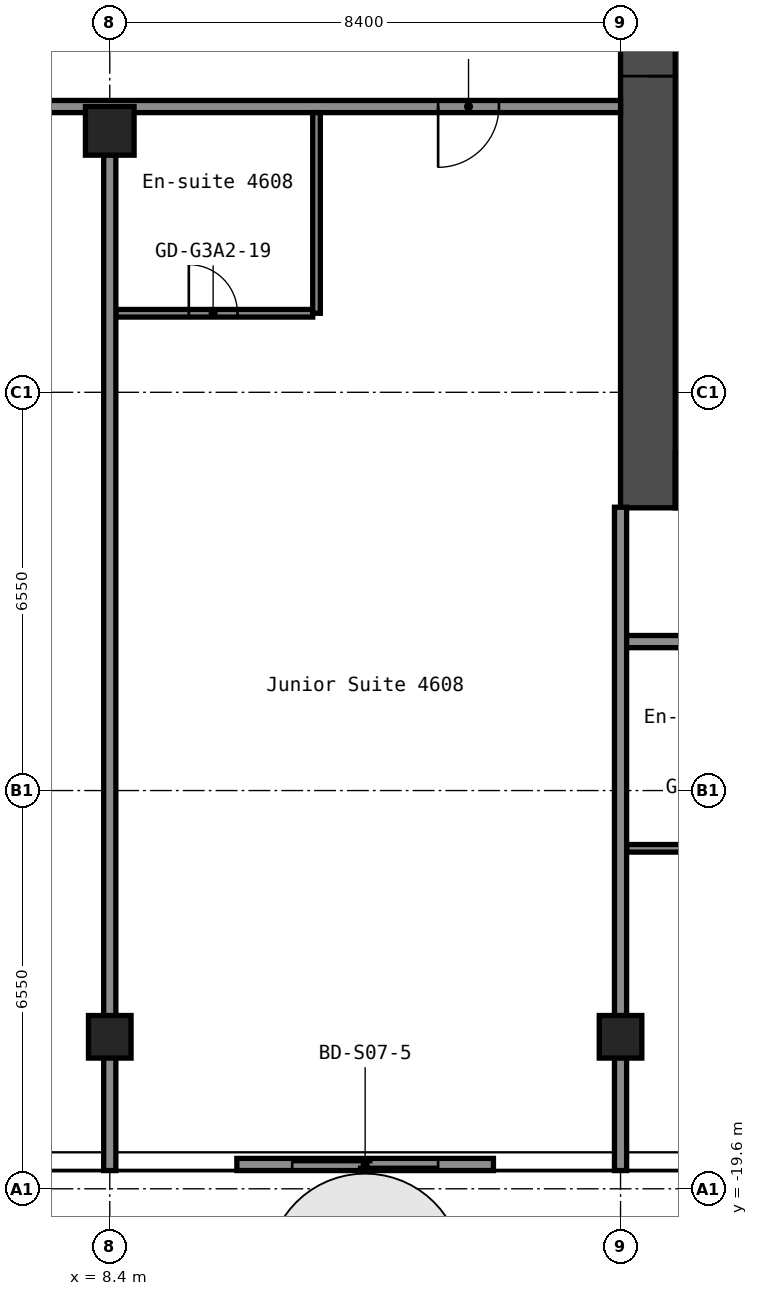
"""IFC4 building model, lengths in metres.
Left out: names, types, materials, properties, quantities, classifications, styles, units other than length and angle.
Written with IfcOpenShell. Run it as: python <this file> out.ifc"""

import sys

from ifc_helpers import new_model, si_unit, direction, frame, frame_2d, origin, origin_2d, place, context, subcontext, project, spatial, rectangle, hollow_rectangle, extrude, element, fill, save


model = new_model("IFC4")
c1 = context("Model", 3, precision=1e-05, world=origin(), true_north=direction((0.0, 1.0)))
c2 = subcontext(c1, "Body", "Model", "MODEL_VIEW")
j1 = project(units=[si_unit("LENGTHUNIT", "METRE"), si_unit("PLANEANGLEUNIT", "RADIAN")], contexts=[c1])
p1 = place(None, origin())
s1 = spatial("IfcSite", under=j1, at=p1, CompositionType="ELEMENT")
p2 = place(p1, origin())
s2 = spatial("IfcBuilding", under=s1, at=p2, CompositionType="ELEMENT")
p3 = place(p2, frame((0.0, 0.0, 163.0)))
s3 = spatial("IfcBuildingStorey", under=s2, at=p3, CompositionType="ELEMENT", Elevation=163.0)
p4 = place(p3, frame((8.4, -17.1, 0.0), z_axis=(0.0, 0.0, 1.0), x_axis=(1.0, 0.0, 0.0)))
e1 = element("IfcColumn", 1, at=p4, inside=s3, PredefinedType="COLUMN", context=c2, shape_type="SweptSolid", body=[
    extrude(hollow_rectangle(XDim=0.7, YDim=0.7, WallThickness=0.028, at=origin_2d()), origin(), (0.0, 0.0, 1.0), 2.75),
])
p5 = place(p3, frame((8.4, -2.2, 0.0), z_axis=(0.0, 0.0, 1.0), x_axis=(1.0, 0.0, 0.0)))
e2 = element("IfcColumn", 2, at=p5, inside=s3, PredefinedType="COLUMN", context=c2, shape_type="SweptSolid", body=[
    extrude(hollow_rectangle(XDim=0.8, YDim=0.8, WallThickness=0.032, at=origin_2d()), origin(), (0.0, 0.0, 1.0), 2.75),
])
p6 = place(p3, frame((16.8, -17.1, 0.0), z_axis=(0.0, 0.0, 1.0), x_axis=(1.0, 0.0, 0.0)))
e3 = element("IfcColumn", 3, at=p6, inside=s3, PredefinedType="COLUMN", context=c2, shape_type="SweptSolid", body=[
    extrude(hollow_rectangle(XDim=0.7, YDim=0.7, WallThickness=0.028, at=origin_2d()), origin(), (0.0, 0.0, 1.0), 2.75),
])
p7 = place(p3, frame((17.25, -8.4, 0.0), z_axis=(0.0, 0.0, 1.0), x_axis=(0.0, 1.0, 0.0)))
e4 = element("IfcWall", 4, at=p7, inside=s3, PredefinedType="SHEAR", context=c2, shape_type="SweptSolid", body=[
    extrude(rectangle(XDim=16.8, YDim=0.9, at=frame_2d((8.4, 0.0))), origin(), (0.0, 0.0, 1.0), 2.75),
])
p8 = place(p7, frame((7.1, 0.0, 0.0)))
e5 = element("IfcOpeningElement", 5, at=p8, cuts=e4, PredefinedType="OPENING", context=c2, shape_type="SweptSolid", body=[
    extrude(rectangle(XDim=1.6, YDim=2.1, at=frame_2d((0.8, 1.05))), frame((0.0, 0.46, 0.0), z_axis=(0.0, -1.0, 0.0), x_axis=(1.0, 0.0, 0.0)), (0.0, 0.0, 1.0), 0.92),
])
p9 = place(p3, frame((17.7, -7.95, 0.0), z_axis=(0.0, 0.0, 1.0), x_axis=(1.0, 0.0, 0.0)))
e6 = element("IfcWall", 6, at=p9, inside=s3, PredefinedType="SHEAR", context=c2, shape_type="SweptSolid", body=[
    extrude(rectangle(XDim=15.0, YDim=0.9, at=frame_2d((7.5, 0.0))), origin(), (0.0, 0.0, 1.0), 2.75),
])
p10 = place(p9, frame((2.55, 0.0, 0.0)))
e7 = element("IfcOpeningElement", 7, at=p10, cuts=e6, PredefinedType="OPENING", context=c2, shape_type="SweptSolid", body=[
    extrude(rectangle(XDim=1.0, YDim=2.1, at=frame_2d((0.5, 1.05))), frame((0.0, 0.46, 0.0), z_axis=(0.0, -1.0, 0.0), x_axis=(1.0, 0.0, 0.0)), (0.0, 0.0, 1.0), 0.92),
])
p11 = place(p3, frame((16.9, -14.0, 0.0), z_axis=(0.0, 0.0, 1.0), x_axis=(1.0, 0.0, 0.0)))
e8 = element("IfcWall", 8, at=p11, inside=s3, PredefinedType="PARTITIONING", context=c2, shape_type="SweptSolid", body=[
    extrude(rectangle(XDim=3.238, YDim=0.125, at=frame_2d((1.619, 0.0))), origin(), (0.0, 0.0, 1.0), 2.75),
])
p12 = place(p11, frame((1.2, 0.0, 0.0)))
e9 = element("IfcOpeningElement", 9, at=p12, cuts=e8, PredefinedType="OPENING", context=c2, shape_type="SweptSolid", body=[
    extrude(rectangle(XDim=0.8, YDim=2.1, at=frame_2d((0.4, 1.05))), frame((0.0, 0.073, 0.0), z_axis=(0.0, -1.0, 0.0), x_axis=(1.0, 0.0, 0.0)), (0.0, 0.0, 1.0), 0.145),
])
p13 = place(p3, frame((16.8, -10.6, 0.0), z_axis=(0.0, 0.0, 1.0), x_axis=(1.0, 0.0, 0.0)))
e10 = element("IfcWall", 10, at=p13, inside=s3, PredefinedType="PARTITIONING", context=c2, shape_type="SweptSolid", body=[
    extrude(rectangle(XDim=25.9, YDim=0.2, at=frame_2d((12.95, 0.0))), origin(), (0.0, 0.0, 1.0), 2.75),
])
p14 = place(p13, frame((5.4, 0.0, 0.0)))
e11 = element("IfcOpeningElement", 11, at=p14, cuts=e10, PredefinedType="OPENING", context=c2, shape_type="SweptSolid", body=[
    extrude(rectangle(XDim=1.0, YDim=2.1, at=frame_2d((0.5, 1.05))), frame((0.0, 0.11, 0.0), z_axis=(0.0, -1.0, 0.0), x_axis=(1.0, 0.0, 0.0)), (0.0, 0.0, 1.0), 0.22),
])
p15 = place(p13, frame((10.4, 0.0, 0.0)))
e12 = element("IfcOpeningElement", 12, at=p15, cuts=e10, PredefinedType="OPENING", context=c2, shape_type="SweptSolid", body=[
    extrude(rectangle(XDim=1.0, YDim=2.1, at=frame_2d((0.5, 1.05))), frame((0.0, 0.11, 0.0), z_axis=(0.0, -1.0, 0.0), x_axis=(1.0, 0.0, 0.0)), (0.0, 0.0, 1.0), 0.22),
])
p16 = place(p13, frame((22.4, 0.0, 0.0)))
e13 = element("IfcOpeningElement", 13, at=p16, cuts=e10, PredefinedType="OPENING", context=c2, shape_type="SweptSolid", body=[
    extrude(rectangle(XDim=1.0, YDim=2.1, at=frame_2d((0.5, 1.05))), frame((0.0, 0.11, 0.0), z_axis=(0.0, -1.0, 0.0), x_axis=(1.0, 0.0, 0.0)), (0.0, 0.0, 1.0), 0.22),
])
p17 = place(p3, frame((8.5, -5.2, 0.0), z_axis=(0.0, 0.0, 1.0), x_axis=(1.0, 0.0, 0.0)))
e14 = element("IfcWall", 14, at=p17, inside=s3, PredefinedType="PARTITIONING", context=c2, shape_type="SweptSolid", body=[
    extrude(rectangle(XDim=3.238, YDim=0.125, at=frame_2d((1.619, 0.0))), origin(), (0.0, 0.0, 1.0), 2.75),
])
p18 = place(p17, frame((1.2, 0.0, 0.0)))
e15 = element("IfcOpeningElement", 15, at=p18, cuts=e14, PredefinedType="OPENING", context=c2, shape_type="SweptSolid", body=[
    extrude(rectangle(XDim=0.8, YDim=2.1, at=frame_2d((0.4, 1.05))), frame((0.0, 0.073, 0.0), z_axis=(0.0, -1.0, 0.0), x_axis=(1.0, 0.0, 0.0)), (0.0, 0.0, 1.0), 0.145),
])
p19 = place(p3, frame((-16.8, -1.8, 0.0), z_axis=(0.0, 0.0, 1.0), x_axis=(1.0, 0.0, 0.0)))
e16 = element("IfcWall", 16, at=p19, inside=s3, PredefinedType="PARTITIONING", context=c2, shape_type="SweptSolid", body=[
    extrude(rectangle(XDim=33.6, YDim=0.2, at=frame_2d((16.8, 0.0))), origin(), (0.0, 0.0, 1.0), 2.75),
])
p20 = place(p19, frame((5.4, 0.0, 0.0)))
e17 = element("IfcOpeningElement", 17, at=p20, cuts=e16, PredefinedType="OPENING", context=c2, shape_type="SweptSolid", body=[
    extrude(rectangle(XDim=1.0, YDim=2.1, at=frame_2d((0.5, 1.05))), frame((0.0, 0.11, 0.0), z_axis=(0.0, -1.0, 0.0), x_axis=(1.0, 0.0, 0.0)), (0.0, 0.0, 1.0), 0.22),
])
p21 = place(p19, frame((10.385, 0.0, 0.0)))
e18 = element("IfcOpeningElement", 18, at=p21, cuts=e16, PredefinedType="OPENING", context=c2, shape_type="SweptSolid", body=[
    extrude(rectangle(XDim=0.9, YDim=2.1, at=frame_2d((0.45, 1.05))), frame((0.0, 0.11, 0.0), z_axis=(0.0, -1.0, 0.0), x_axis=(1.0, 0.0, 0.0)), (0.0, 0.0, 1.0), 0.22),
])
p22 = place(p19, frame((14.585, 0.0, 0.0)))
e19 = element("IfcOpeningElement", 19, at=p22, cuts=e16, PredefinedType="OPENING", context=c2, shape_type="SweptSolid", body=[
    extrude(rectangle(XDim=0.9, YDim=2.1, at=frame_2d((0.45, 1.05))), frame((0.0, 0.11, 0.0), z_axis=(0.0, -1.0, 0.0), x_axis=(1.0, 0.0, 0.0)), (0.0, 0.0, 1.0), 0.22),
])
p23 = place(p19, frame((22.2, 0.0, 0.0)))
e20 = element("IfcOpeningElement", 20, at=p23, cuts=e16, PredefinedType="OPENING", context=c2, shape_type="SweptSolid", body=[
    extrude(rectangle(XDim=1.0, YDim=2.1, at=frame_2d((0.5, 1.05))), frame((0.0, 0.11, 0.0), z_axis=(0.0, -1.0, 0.0), x_axis=(1.0, 0.0, 0.0)), (0.0, 0.0, 1.0), 0.22),
])
p24 = place(p19, frame((30.6, 0.0, 0.0)))
e21 = element("IfcOpeningElement", 21, at=p24, cuts=e16, PredefinedType="OPENING", context=c2, shape_type="SweptSolid", body=[
    extrude(rectangle(XDim=1.0, YDim=2.1, at=frame_2d((0.5, 1.05))), frame((0.0, 0.11, 0.0), z_axis=(0.0, -1.0, 0.0), x_axis=(1.0, 0.0, 0.0)), (0.0, 0.0, 1.0), 0.22),
])
p25 = place(p3, frame((8.4, -19.3, 0.0), z_axis=(0.0, 0.0, 1.0), x_axis=(0.0, 1.0, 0.0)))
e22 = element("IfcWall", 22, at=p25, inside=s3, PredefinedType="PARTITIONING", context=c2, shape_type="SweptSolid", body=[
    extrude(rectangle(XDim=16.71, YDim=0.2, at=frame_2d((8.355, 0.0))), origin(), (0.0, 0.0, 1.0), 2.75),
])
p26 = place(p3, frame((11.8, -5.2, 0.0), z_axis=(0.0, 0.0, 1.0), x_axis=(0.0, 1.0, 0.0)))
e23 = element("IfcWall", 23, at=p26, inside=s3, PredefinedType="PARTITIONING", context=c2, shape_type="SweptSolid", body=[
    extrude(rectangle(XDim=3.3, YDim=0.125, at=frame_2d((1.65, 0.0))), origin(), (0.0, 0.0, 1.0), 2.75),
])
p27 = place(p3, frame((16.8, -19.3, 0.0), z_axis=(0.0, 0.0, 1.0), x_axis=(0.0, 1.0, 0.0)))
e24 = element("IfcWall", 24, at=p27, inside=s3, PredefinedType="PARTITIONING", context=c2, shape_type="SweptSolid", body=[
    extrude(rectangle(XDim=10.91, YDim=0.2, at=frame_2d((5.455, 0.0))), origin(), (0.0, 0.0, 1.0), 2.75),
])
p28 = place(p3, frame((10.49, -19.2, 0.0), z_axis=(0.0, 0.0, 1.0), x_axis=(1.0, 0.0, 0.0)))
p29 = place(p28, frame((0.91, 0.0, 0.0)))
p30 = place(p29, frame((2.4, 0.0, 0.0), z_axis=(0.0, 0.0, 1.0), x_axis=(-1.0, 0.0, 0.0)))
e25 = element("IfcDoor", 25, at=p30, inside=s3, OperationType="SLIDING_TO_LEFT", PredefinedType="DOOR", context=c2, shape_type="SweptSolid", body=[
    extrude(rectangle(XDim=2.4, YDim=2.2, at=frame_2d((1.2, 1.1))), frame((0.0, 0.025, 0.0), z_axis=(0.0, -1.0, 0.0), x_axis=(1.0, 0.0, 0.0)), (0.0, 0.0, 1.0), 0.05),
])
p31 = place(p8, origin())
e26 = element("IfcDoor", 26, at=p31, inside=s3, OperationType="DOUBLE_DOOR_SINGLE_SWING", PredefinedType="DOOR", context=c2, shape_type="SweptSolid", body=[
    extrude(rectangle(XDim=1.6, YDim=2.1, at=frame_2d((0.8, 1.05))), frame((0.0, 0.025, 0.0), z_axis=(0.0, -1.0, 0.0), x_axis=(1.0, 0.0, 0.0)), (0.0, 0.0, 1.0), 0.05),
])
fill(e5, e26)
p32 = place(p18, origin())
e27 = element("IfcDoor", 27, at=p32, inside=s3, OperationType="SINGLE_SWING_RIGHT", PredefinedType="DOOR", context=c2, shape_type="SweptSolid", body=[
    extrude(rectangle(XDim=0.8, YDim=2.1, at=frame_2d((0.4, 1.05))), frame((0.0, 0.025, 0.0), z_axis=(0.0, -1.0, 0.0), x_axis=(1.0, 0.0, 0.0)), (0.0, 0.0, 1.0), 0.05),
])
fill(e15, e27)
p33 = place(p24, origin())
e28 = element("IfcDoor", 28, at=p33, inside=s3, OperationType="SINGLE_SWING_LEFT", PredefinedType="DOOR", context=c2, shape_type="SweptSolid", body=[
    extrude(rectangle(XDim=1.0, YDim=2.1, at=frame_2d((0.5, 1.05))), frame((0.0, 0.025, 0.0), z_axis=(0.0, -1.0, 0.0), x_axis=(1.0, 0.0, 0.0)), (0.0, 0.0, 1.0), 0.05),
])
fill(e21, e28)
save(model, sys.argv[1])
